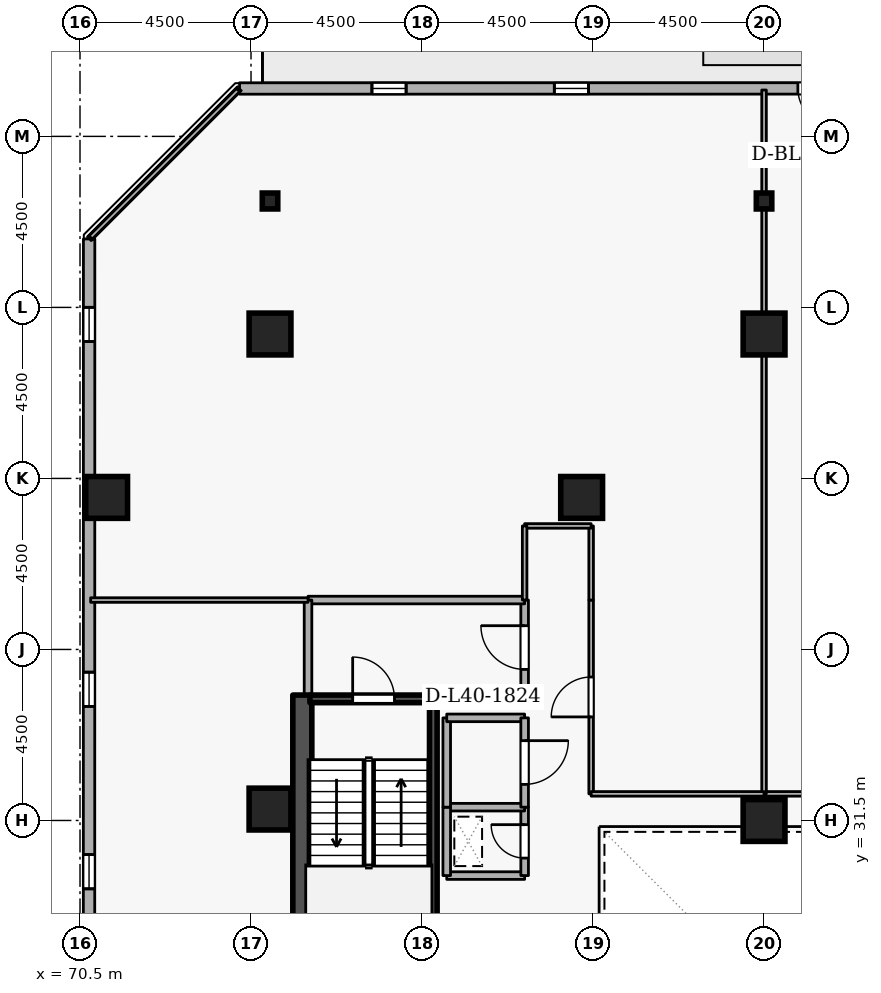
"""IFC4 building model, lengths in metres.
Left out: names, types, materials, properties, quantities, classifications, styles, units other than length and angle.
Written with IfcOpenShell. Run it as: python <this file> out.ifc"""

import sys

from ifc_helpers import new_model, si_unit, direction, frame, frame_2d, origin, origin_2d, place, context, subcontext, project, spatial, rectangle, i_section, extrude, element, fill, save


model = new_model("IFC4")
c1 = context("Model", 3, precision=1e-05, world=origin(), true_north=direction((0.0, 1.0)))
c2 = subcontext(c1, "Body", "Model", "MODEL_VIEW")
j1 = project(units=[si_unit("LENGTHUNIT", "METRE"), si_unit("PLANEANGLEUNIT", "RADIAN")], contexts=[c1])
p1 = place(None, origin())
s1 = spatial("IfcSite", under=j1, at=p1, CompositionType="ELEMENT")
p2 = place(p1, origin())
s2 = spatial("IfcBuilding", under=s1, at=p2, CompositionType="ELEMENT")
p3 = place(p2, frame((0.0, 0.0, 152.7)))
s3 = spatial("IfcBuildingStorey", under=s2, at=p3, CompositionType="ELEMENT", Elevation=152.7)
p4 = place(p3, frame((76.35, 19.2, 0.0), z_axis=(0.0, 0.0, 1.0), x_axis=(0.0, 1.0, 0.0)))
e1 = element("IfcWall", 1, at=p4, inside=s3, PredefinedType="SHEAR", context=c2, shape_type="SweptSolid", body=[
    extrude(rectangle(XDim=15.6, YDim=0.5, at=frame_2d((7.8, 0.0))), origin(), (0.0, 0.0, 1.0), 3.6),
])
for number, where, z_axis, x_axis in (
    (2, (88.5, 44.3, 0.0), (0.0, 0.0, 1.0), (1.0, 0.0, 0.0)),
    (3, (75.5, 44.3, 0.0), (0.0, 0.0, 1.0), (1.0, 0.0, 0.0)),
    (4, (71.2, 40.0, 0.0), (0.0, 0.0, 1.0), (1.0, 0.0, 0.0)),
    (5, (83.7, 40.0, 0.0), (0.0, 0.0, 1.0), (1.0, 0.0, 0.0)),
    (6, (75.5, 31.8, 0.0), (0.0, 0.0, 1.0), (1.0, 0.0, 0.0)),
    (7, (88.5, 31.5, 0.0), (0.0, 0.0, 1.0), (1.0, 0.0, 0.0)),
):
    element("IfcColumn", number, at=place(p3, frame(where, z_axis=z_axis, x_axis=x_axis)), inside=s3, PredefinedType="COLUMN", context=c2, shape_type="SweptSolid", body=[
        extrude(rectangle(XDim=1.1, YDim=1.1, at=origin_2d()), origin(), (0.0, 0.0, 1.0), 3.6),
    ])
for number, where, z_axis, x_axis in (
    (8, (88.5, 47.8, 0.0), (0.0, 0.0, 1.0), (1.0, 0.0, 0.0)),
    (9, (75.5, 47.8, 0.0), (0.0, 0.0, 1.0), (1.0, 0.0, 0.0)),
):
    element("IfcColumn", number, at=place(p3, frame(where, z_axis=z_axis, x_axis=x_axis)), inside=s3, PredefinedType="COLUMN", context=c2, shape_type="SweptSolid", body=[
        extrude(i_section(OverallWidth=0.407, OverallDepth=0.419, WebThickness=0.031, FlangeThickness=0.049, FilletRadius=0.015, at=origin_2d()), origin(), (0.0, 0.0, 1.0), 3.6),
    ])
p5 = place(p3, frame((109.681, 50.765, 0.0), z_axis=(0.0, 0.0, 1.0), x_axis=(-0.999999991209, -0.000132597301, 0.0)))
e10 = element("IfcWall", 10, at=p5, inside=s3, PredefinedType="STANDARD", context=c2, shape_type="SweptSolid", body=[
    extrude(rectangle(XDim=34.983, YDim=0.3, at=frame_2d((17.492, 0.0))), origin(), (0.0, 0.0, 1.0), 2.7),
])
p6 = place(p5, frame((19.292, 0.0, 0.0)))
e11 = element("IfcOpeningElement", 11, at=p6, cuts=e10, PredefinedType="OPENING", context=c2, shape_type="SweptSolid", body=[
    extrude(rectangle(XDim=1.0, YDim=2.08, at=frame_2d((0.5, 1.04))), frame((0.0, 0.16, 0.0), z_axis=(0.0, -1.0, 0.0), x_axis=(1.0, 0.0, 0.0)), (0.0, 0.0, 1.0), 0.32),
])
p7 = place(p5, frame((1.8, 0.0, 0.72)))
e12 = element("IfcOpeningElement", 12, at=p7, cuts=e10, PredefinedType="OPENING", context=c2, shape_type="SweptSolid", body=[
    extrude(rectangle(XDim=0.9, YDim=1.75, at=frame_2d((0.45, 0.875))), frame((0.0, 0.16, 0.0), z_axis=(0.0, -1.0, 0.0), x_axis=(1.0, 0.0, 0.0)), (0.0, 0.0, 1.0), 0.32),
])
p8 = place(p5, frame((6.6, 0.0, 0.72)))
e13 = element("IfcOpeningElement", 13, at=p8, cuts=e10, PredefinedType="OPENING", context=c2, shape_type="SweptSolid", body=[
    extrude(rectangle(XDim=0.9, YDim=1.75, at=frame_2d((0.45, 0.875))), frame((0.0, 0.16, 0.0), z_axis=(0.0, -1.0, 0.0), x_axis=(1.0, 0.0, 0.0)), (0.0, 0.0, 1.0), 0.32),
])
p9 = place(p5, frame((11.4, 0.0, 0.72)))
e14 = element("IfcOpeningElement", 14, at=p9, cuts=e10, PredefinedType="OPENING", context=c2, shape_type="SweptSolid", body=[
    extrude(rectangle(XDim=0.9, YDim=1.75, at=frame_2d((0.45, 0.875))), frame((0.0, 0.16, 0.0), z_axis=(0.0, -1.0, 0.0), x_axis=(1.0, 0.0, 0.0)), (0.0, 0.0, 1.0), 0.32),
])
p10 = place(p5, frame((16.2, 0.0, 0.72)))
e15 = element("IfcOpeningElement", 15, at=p10, cuts=e10, PredefinedType="OPENING", context=c2, shape_type="SweptSolid", body=[
    extrude(rectangle(XDim=0.9, YDim=1.75, at=frame_2d((0.45, 0.875))), frame((0.0, 0.16, 0.0), z_axis=(0.0, -1.0, 0.0), x_axis=(1.0, 0.0, 0.0)), (0.0, 0.0, 1.0), 0.32),
])
p11 = place(p5, frame((25.8, 0.0, 0.72)))
e16 = element("IfcOpeningElement", 16, at=p11, cuts=e10, PredefinedType="OPENING", context=c2, shape_type="SweptSolid", body=[
    extrude(rectangle(XDim=0.9, YDim=1.75, at=frame_2d((0.45, 0.875))), frame((0.0, 0.16, 0.0), z_axis=(0.0, -1.0, 0.0), x_axis=(1.0, 0.0, 0.0)), (0.0, 0.0, 1.0), 0.32),
])
p12 = place(p5, frame((30.6, 0.0, 0.72)))
e17 = element("IfcOpeningElement", 17, at=p12, cuts=e10, PredefinedType="OPENING", context=c2, shape_type="SweptSolid", body=[
    extrude(rectangle(XDim=0.9, YDim=1.75, at=frame_2d((0.45, 0.875))), frame((0.0, 0.16, 0.0), z_axis=(0.0, -1.0, 0.0), x_axis=(1.0, 0.0, 0.0)), (0.0, 0.0, 1.0), 0.32),
])
p13 = place(p3, frame((70.74, 46.802, 0.0), z_axis=(0.0, 0.0, 1.0), x_axis=(-0.000132597301, -0.999999991209, 0.0)))
e18 = element("IfcWall", 18, at=p13, inside=s3, PredefinedType="STANDARD", context=c2, shape_type="SweptSolid", body=[
    extrude(rectangle(XDim=34.983, YDim=0.3, at=frame_2d((17.492, 0.0))), origin(), (0.0, 0.0, 1.0), 2.7),
])
p14 = place(p13, frame((1.8, 0.0, 0.72)))
e19 = element("IfcOpeningElement", 19, at=p14, cuts=e18, PredefinedType="OPENING", context=c2, shape_type="SweptSolid", body=[
    extrude(rectangle(XDim=0.9, YDim=1.75, at=frame_2d((0.45, 0.875))), frame((0.0, 0.16, 0.0), z_axis=(0.0, -1.0, 0.0), x_axis=(1.0, 0.0, 0.0)), (0.0, 0.0, 1.0), 0.32),
])
p15 = place(p13, frame((11.4, 0.0, 0.72)))
e20 = element("IfcOpeningElement", 20, at=p15, cuts=e18, PredefinedType="OPENING", context=c2, shape_type="SweptSolid", body=[
    extrude(rectangle(XDim=0.9, YDim=1.75, at=frame_2d((0.45, 0.875))), frame((0.0, 0.16, 0.0), z_axis=(0.0, -1.0, 0.0), x_axis=(1.0, 0.0, 0.0)), (0.0, 0.0, 1.0), 0.32),
])
p16 = place(p13, frame((16.2, 0.0, 0.72)))
e21 = element("IfcOpeningElement", 21, at=p16, cuts=e18, PredefinedType="OPENING", context=c2, shape_type="SweptSolid", body=[
    extrude(rectangle(XDim=0.9, YDim=1.75, at=frame_2d((0.45, 0.875))), frame((0.0, 0.16, 0.0), z_axis=(0.0, -1.0, 0.0), x_axis=(1.0, 0.0, 0.0)), (0.0, 0.0, 1.0), 0.32),
])
p17 = place(p13, frame((21.0, 0.0, 0.72)))
e22 = element("IfcOpeningElement", 22, at=p17, cuts=e18, PredefinedType="OPENING", context=c2, shape_type="SweptSolid", body=[
    extrude(rectangle(XDim=0.9, YDim=1.75, at=frame_2d((0.45, 0.875))), frame((0.0, 0.16, 0.0), z_axis=(0.0, -1.0, 0.0), x_axis=(1.0, 0.0, 0.0)), (0.0, 0.0, 1.0), 0.32),
])
p18 = place(p13, frame((25.8, 0.0, 0.72)))
e23 = element("IfcOpeningElement", 23, at=p18, cuts=e18, PredefinedType="OPENING", context=c2, shape_type="SweptSolid", body=[
    extrude(rectangle(XDim=0.9, YDim=1.75, at=frame_2d((0.45, 0.875))), frame((0.0, 0.16, 0.0), z_axis=(0.0, -1.0, 0.0), x_axis=(1.0, 0.0, 0.0)), (0.0, 0.0, 1.0), 0.32),
])
p19 = place(p13, frame((30.6, 0.0, 0.72)))
e24 = element("IfcOpeningElement", 24, at=p19, cuts=e18, PredefinedType="OPENING", context=c2, shape_type="SweptSolid", body=[
    extrude(rectangle(XDim=0.9, YDim=1.75, at=frame_2d((0.45, 0.875))), frame((0.0, 0.16, 0.0), z_axis=(0.0, -1.0, 0.0), x_axis=(1.0, 0.0, 0.0)), (0.0, 0.0, 1.0), 0.32),
])
p20 = place(p3, frame((76.55, 34.7, 0.0), z_axis=(0.0, 0.0, 1.0), x_axis=(1.0, 0.0, 0.0)))
e25 = element("IfcWall", 25, at=p20, inside=s3, PredefinedType="SHEAR", context=c2, shape_type="SweptSolid", body=[
    extrude(rectangle(XDim=3.35, YDim=0.2, at=frame_2d((1.675, 0.0))), origin(), (0.0, 0.0, 1.0), 3.6),
])
p21 = place(p20, frame((1.125, 0.0, 0.0)))
e26 = element("IfcOpeningElement", 26, at=p21, cuts=e25, PredefinedType="OPENING", context=c2, shape_type="SweptSolid", body=[
    extrude(rectangle(XDim=1.1, YDim=2.1, at=frame_2d((0.55, 1.05))), frame((0.0, 0.11, 0.0), z_axis=(0.0, -1.0, 0.0), x_axis=(1.0, 0.0, 0.0)), (0.0, 0.0, 1.0), 0.22),
])
p22 = place(p3, frame((79.797, 27.45, 0.0), z_axis=(0.0, 0.0, 1.0), x_axis=(0.0, 1.0, 0.0)))
e27 = element("IfcWall", 27, at=p22, inside=s3, PredefinedType="SHEAR", context=c2, shape_type="SweptSolid", body=[
    extrude(rectangle(XDim=7.1, YDim=0.2, at=frame_2d((3.55, 0.0))), origin(), (0.0, 0.0, 1.0), 3.6),
])
p23 = place(p3, frame((79.9, 34.8, 0.0), z_axis=(0.0, 0.0, 1.0), x_axis=(1.0, 0.0, 0.0)))
e28 = element("IfcWall", 28, at=p23, inside=s3, PredefinedType="STANDARD", context=c2, shape_type="SweptSolid", body=[
    extrude(rectangle(XDim=2.3, YDim=0.2, at=frame_2d((1.15, 0.0))), origin(), (0.0, 0.0, 1.0), 2.545),
])
p24 = place(p3, frame((82.2, 34.8, 0.0), z_axis=(0.0, 0.0, 1.0), x_axis=(0.0, 1.0, 0.0)))
e29 = element("IfcWall", 29, at=p24, inside=s3, PredefinedType="STANDARD", context=c2, shape_type="SweptSolid", body=[
    extrude(rectangle(XDim=2.5, YDim=0.2, at=frame_2d((1.25, 0.0))), origin(), (0.0, 0.0, 1.0), 3.34),
])
p25 = place(p24, frame((0.675, 0.0, 0.0)))
e30 = element("IfcOpeningElement", 30, at=p25, cuts=e29, PredefinedType="OPENING", context=c2, shape_type="SweptSolid", body=[
    extrude(rectangle(XDim=1.15, YDim=2.1, at=frame_2d((0.575, 1.05))), frame((0.0, 0.11, 0.0), z_axis=(0.0, -1.0, 0.0), x_axis=(1.0, 0.0, 0.0)), (0.0, 0.0, 1.0), 0.22),
])
p26 = place(p3, frame((82.2, 37.3, 0.0), z_axis=(0.0, 0.0, 1.0), x_axis=(-1.0, 0.0, 0.0)))
e31 = element("IfcWall", 31, at=p26, inside=s3, PredefinedType="STANDARD", context=c2, shape_type="SweptSolid", body=[
    extrude(rectangle(XDim=5.7, YDim=0.2, at=frame_2d((2.85, 0.0))), origin(), (0.0, 0.0, 1.0), 3.34),
])
p27 = place(p3, frame((76.5, 37.3, 0.0), z_axis=(0.0, 0.0, 1.0), x_axis=(0.0, -1.0, 0.0)))
e32 = element("IfcWall", 32, at=p27, inside=s3, PredefinedType="STANDARD", context=c2, shape_type="SweptSolid", body=[
    extrude(rectangle(XDim=2.5, YDim=0.2, at=frame_2d((1.25, 0.0))), origin(), (0.0, 0.0, 1.0), 3.34),
])
p28 = place(p3, frame((80.15, 30.05, 0.0), z_axis=(0.0, 0.0, 1.0), x_axis=(1.0, 0.0, 0.0)))
e33 = element("IfcWall", 33, at=p28, inside=s3, PredefinedType="STANDARD", context=c2, shape_type="SweptSolid", body=[
    extrude(rectangle(XDim=2.05, YDim=0.2, at=frame_2d((1.025, 0.0))), origin(), (0.0, 0.0, 1.0), 3.34),
])
p29 = place(p3, frame((82.2, 30.05, 0.0), z_axis=(0.0, 0.0, 1.0), x_axis=(0.0, 1.0, 0.0)))
e34 = element("IfcWall", 34, at=p29, inside=s3, PredefinedType="STANDARD", context=c2, shape_type="SweptSolid", body=[
    extrude(rectangle(XDim=1.8, YDim=0.2, at=frame_2d((0.9, 0.0))), origin(), (0.0, 0.0, 1.0), 3.34),
])
p30 = place(p29, frame((0.46, 0.0, 0.0)))
e35 = element("IfcOpeningElement", 35, at=p30, cuts=e34, PredefinedType="OPENING", context=c2, shape_type="SweptSolid", body=[
    extrude(rectangle(XDim=0.88, YDim=2.04, at=frame_2d((0.44, 1.02))), frame((0.0, 0.11, 0.0), z_axis=(0.0, -1.0, 0.0), x_axis=(1.0, 0.0, 0.0)), (0.0, 0.0, 1.0), 0.22),
])
p31 = place(p3, frame((82.2, 31.85, 0.0), z_axis=(0.0, 0.0, 1.0), x_axis=(-1.0, 0.0, 0.0)))
e36 = element("IfcWall", 36, at=p31, inside=s3, PredefinedType="STANDARD", context=c2, shape_type="SweptSolid", body=[
    extrude(rectangle(XDim=2.05, YDim=0.2, at=frame_2d((1.025, 0.0))), origin(), (0.0, 0.0, 1.0), 3.34),
])
p32 = place(p3, frame((80.15, 31.85, 0.0), z_axis=(0.0, 0.0, 1.0), x_axis=(0.0, -1.0, 0.0)))
e37 = element("IfcWall", 37, at=p32, inside=s3, PredefinedType="STANDARD", context=c2, shape_type="SweptSolid", body=[
    extrude(rectangle(XDim=1.8, YDim=0.2, at=frame_2d((0.9, 0.0))), origin(), (0.0, 0.0, 1.0), 3.34),
])
p33 = place(p3, frame((80.15, 31.85, 0.0), z_axis=(0.0, 0.0, 1.0), x_axis=(0.0, 1.0, 0.0)))
e38 = element("IfcWall", 38, at=p33, inside=s3, PredefinedType="STANDARD", context=c2, shape_type="SweptSolid", body=[
    extrude(rectangle(XDim=2.35, YDim=0.2, at=frame_2d((1.175, 0.0))), origin(), (0.0, 0.0, 1.0), 3.34),
])
p34 = place(p3, frame((80.15, 34.2, 0.0), z_axis=(0.0, 0.0, 1.0), x_axis=(1.0, 0.0, 0.0)))
e39 = element("IfcWall", 39, at=p34, inside=s3, PredefinedType="STANDARD", context=c2, shape_type="SweptSolid", body=[
    extrude(rectangle(XDim=2.05, YDim=0.2, at=frame_2d((1.025, 0.0))), origin(), (0.0, 0.0, 1.0), 2.545),
])
p35 = place(p3, frame((82.2, 34.2, 0.0), z_axis=(0.0, 0.0, 1.0), x_axis=(0.0, -1.0, 0.0)))
e40 = element("IfcWall", 40, at=p35, inside=s3, PredefinedType="STANDARD", context=c2, shape_type="SweptSolid", body=[
    extrude(rectangle(XDim=2.35, YDim=0.2, at=frame_2d((1.175, 0.0))), origin(), (0.0, 0.0, 1.0), 3.34),
])
p36 = place(p35, frame((0.6, 0.0, 0.0)))
e41 = element("IfcOpeningElement", 41, at=p36, cuts=e40, PredefinedType="OPENING", context=c2, shape_type="SweptSolid", body=[
    extrude(rectangle(XDim=1.15, YDim=2.1, at=frame_2d((0.575, 1.05))), frame((0.0, 0.11, 0.0), z_axis=(0.0, -1.0, 0.0), x_axis=(1.0, 0.0, 0.0)), (0.0, 0.0, 1.0), 0.22),
])
p37 = place(p3, frame((93.05, 32.2, 0.0), z_axis=(0.0, 0.0, 1.0), x_axis=(-1.0, 0.0, 0.0)))
e42 = element("IfcWall", 42, at=p37, inside=s3, PredefinedType="PARTITIONING", context=c2, shape_type="SweptSolid", body=[
    extrude(rectangle(XDim=4.55, YDim=0.12, at=frame_2d((2.275, 0.0))), origin(), (0.0, 0.0, 1.0), 3.34),
])
p38 = place(p3, frame((88.5, 32.2, 0.0), z_axis=(0.0, 0.0, 1.0), x_axis=(0.0, 1.0, 0.0)))
e43 = element("IfcWall", 43, at=p38, inside=s3, PredefinedType="PARTITIONING", context=c2, shape_type="SweptSolid", body=[
    extrude(rectangle(XDim=18.52, YDim=0.12, at=frame_2d((9.26, 0.0))), origin(), (0.0, 0.0, 1.0), 2.932),
])
p39 = place(p3, frame((83.95, 32.2, 0.0), z_axis=(0.0, 0.0, 1.0), x_axis=(0.0, 1.0, 0.0)))
e44 = element("IfcWall", 44, at=p39, inside=s3, PredefinedType="PARTITIONING", context=c2, shape_type="SweptSolid", body=[
    extrude(rectangle(XDim=5.1, YDim=0.12, at=frame_2d((2.55, 0.0))), origin(), (0.0, 0.0, 1.0), 3.34),
])
p40 = place(p39, frame((2.025, 0.0, 0.0)))
e45 = element("IfcOpeningElement", 45, at=p40, cuts=e44, PredefinedType="OPENING", context=c2, shape_type="SweptSolid", body=[
    extrude(rectangle(XDim=1.05, YDim=2.1, at=frame_2d((0.525, 1.05))), frame((0.0, 0.07, 0.0), z_axis=(0.0, -1.0, 0.0), x_axis=(1.0, 0.0, 0.0)), (0.0, 0.0, 1.0), 0.14),
])
p41 = place(p3, frame((83.95, 37.3, 0.0), z_axis=(0.0, 0.0, 1.0), x_axis=(0.0, 1.0, 0.0)))
e46 = element("IfcWall", 46, at=p41, inside=s3, PredefinedType="PARTITIONING", context=c2, shape_type="SweptSolid", body=[
    extrude(rectangle(XDim=1.95, YDim=0.12, at=frame_2d((0.975, 0.0))), origin(), (0.0, 0.0, 1.0), 3.34),
])
p42 = place(p3, frame((83.95, 39.25, 0.0), z_axis=(0.0, 0.0, 1.0), x_axis=(-1.0, 0.0, 0.0)))
e47 = element("IfcWall", 47, at=p42, inside=s3, PredefinedType="PARTITIONING", context=c2, shape_type="SweptSolid", body=[
    extrude(rectangle(XDim=1.75, YDim=0.12, at=frame_2d((0.875, 0.0))), origin(), (0.0, 0.0, 1.0), 3.34),
])
p43 = place(p3, frame((82.2, 39.25, 0.0), z_axis=(0.0, 0.0, 1.0), x_axis=(0.0, -1.0, 0.0)))
e48 = element("IfcWall", 48, at=p43, inside=s3, PredefinedType="PARTITIONING", context=c2, shape_type="SweptSolid", body=[
    extrude(rectangle(XDim=1.95, YDim=0.12, at=frame_2d((0.975, 0.0))), origin(), (0.0, 0.0, 1.0), 3.34),
])
p44 = place(p3, frame((76.5, 37.3, 0.0), z_axis=(0.0, 0.0, 1.0), x_axis=(-1.0, 0.0, 0.0)))
e49 = element("IfcWall", 49, at=p44, inside=s3, PredefinedType="PARTITIONING", context=c2, shape_type="SweptSolid", body=[
    extrude(rectangle(XDim=5.72, YDim=0.12, at=frame_2d((2.86, 0.0))), origin(), (0.0, 0.0, 1.0), 3.34),
])
p45 = place(p3, frame((70.78, 46.84, 0.0), z_axis=(0.0, 0.0, 1.0), x_axis=(0.707106781187, 0.707106781187, 0.0)))
e50 = element("IfcWall", 50, at=p45, inside=s3, PredefinedType="PARTITIONING", context=c2, shape_type="SweptSolid", body=[
    extrude(rectangle(XDim=5.487, YDim=0.12, at=frame_2d((2.743, 0.0))), origin(), (0.0, 0.0, 1.0), 3.34),
])
p46 = place(p3, frame((88.5, 32.2, 0.0), z_axis=(0.0, 0.0, 1.0), x_axis=(-1.0, 0.0, 0.0)))
e51 = element("IfcWall", 51, at=p46, inside=s3, PredefinedType="PARTITIONING", context=c2, shape_type="SweptSolid", body=[
    extrude(rectangle(XDim=4.55, YDim=0.12, at=frame_2d((2.275, 0.0))), origin(), (0.0, 0.0, 1.0), 3.34),
])
p47 = place(p6, origin())
e52 = element("IfcDoor", 52, at=p47, inside=s3, OperationType="SINGLE_SWING_LEFT", PredefinedType="DOOR", context=c2, shape_type="SweptSolid", body=[
    extrude(rectangle(XDim=1.0, YDim=2.08, at=frame_2d((0.5, 1.04))), frame((0.0, 0.025, 0.0), z_axis=(0.0, -1.0, 0.0), x_axis=(1.0, 0.0, 0.0)), (0.0, 0.0, 1.0), 0.05),
])
fill(e11, e52)
p48 = place(p11, origin())
e53 = element("IfcWindow", 53, at=p48, inside=s3, PartitioningType="SINGLE_PANEL", PredefinedType="WINDOW", context=c2, shape_type="SweptSolid", body=[
    extrude(rectangle(XDim=0.9, YDim=1.75, at=frame_2d((0.45, 0.875))), frame((0.0, 0.03, 0.0), z_axis=(0.0, -1.0, 0.0), x_axis=(1.0, 0.0, 0.0)), (0.0, 0.0, 1.0), 0.06),
])
fill(e16, e53)
p49 = place(p12, origin())
e54 = element("IfcWindow", 54, at=p49, inside=s3, PartitioningType="SINGLE_PANEL", PredefinedType="WINDOW", context=c2, shape_type="SweptSolid", body=[
    extrude(rectangle(XDim=0.9, YDim=1.75, at=frame_2d((0.45, 0.875))), frame((0.0, 0.03, 0.0), z_axis=(0.0, -1.0, 0.0), x_axis=(1.0, 0.0, 0.0)), (0.0, 0.0, 1.0), 0.06),
])
fill(e17, e54)
p50 = place(p14, origin())
e55 = element("IfcWindow", 55, at=p50, inside=s3, PartitioningType="SINGLE_PANEL", PredefinedType="WINDOW", context=c2, shape_type="SweptSolid", body=[
    extrude(rectangle(XDim=0.9, YDim=1.75, at=frame_2d((0.45, 0.875))), frame((0.0, 0.03, 0.0), z_axis=(0.0, -1.0, 0.0), x_axis=(1.0, 0.0, 0.0)), (0.0, 0.0, 1.0), 0.06),
])
fill(e19, e55)
p51 = place(p15, origin())
e56 = element("IfcWindow", 56, at=p51, inside=s3, PartitioningType="SINGLE_PANEL", PredefinedType="WINDOW", context=c2, shape_type="SweptSolid", body=[
    extrude(rectangle(XDim=0.9, YDim=1.75, at=frame_2d((0.45, 0.875))), frame((0.0, 0.03, 0.0), z_axis=(0.0, -1.0, 0.0), x_axis=(1.0, 0.0, 0.0)), (0.0, 0.0, 1.0), 0.06),
])
fill(e20, e56)
p52 = place(p16, origin())
e57 = element("IfcWindow", 57, at=p52, inside=s3, PartitioningType="SINGLE_PANEL", PredefinedType="WINDOW", context=c2, shape_type="SweptSolid", body=[
    extrude(rectangle(XDim=0.9, YDim=1.75, at=frame_2d((0.45, 0.875))), frame((0.0, 0.03, 0.0), z_axis=(0.0, -1.0, 0.0), x_axis=(1.0, 0.0, 0.0)), (0.0, 0.0, 1.0), 0.06),
])
fill(e21, e57)
p53 = place(p21, origin())
e58 = element("IfcDoor", 58, at=p53, inside=s3, OperationType="SINGLE_SWING_LEFT", PredefinedType="DOOR", context=c2, shape_type="SweptSolid", body=[
    extrude(rectangle(XDim=1.1, YDim=2.1, at=frame_2d((0.55, 1.05))), frame((0.0, 0.025, 0.0), z_axis=(0.0, -1.0, 0.0), x_axis=(1.0, 0.0, 0.0)), (0.0, 0.0, 1.0), 0.05),
])
fill(e26, e58)
p54 = place(p25, origin())
e59 = element("IfcDoor", 59, at=p54, inside=s3, OperationType="SINGLE_SWING_RIGHT", PredefinedType="DOOR", context=c2, shape_type="SweptSolid", body=[
    extrude(rectangle(XDim=1.15, YDim=2.1, at=frame_2d((0.575, 1.05))), frame((0.0, 0.025, 0.0), z_axis=(0.0, -1.0, 0.0), x_axis=(1.0, 0.0, 0.0)), (0.0, 0.0, 1.0), 0.05),
])
fill(e30, e59)
p55 = place(p30, origin())
e60 = element("IfcDoor", 60, at=p55, inside=s3, OperationType="SINGLE_SWING_RIGHT", PredefinedType="DOOR", context=c2, shape_type="SweptSolid", body=[
    extrude(rectangle(XDim=0.88, YDim=2.04, at=frame_2d((0.44, 1.02))), frame((0.0, 0.025, 0.0), z_axis=(0.0, -1.0, 0.0), x_axis=(1.0, 0.0, 0.0)), (0.0, 0.0, 1.0), 0.05),
])
fill(e35, e60)
p56 = place(p36, origin())
e61 = element("IfcDoor", 61, at=p56, inside=s3, OperationType="SINGLE_SWING_LEFT", PredefinedType="DOOR", context=c2, shape_type="SweptSolid", body=[
    extrude(rectangle(XDim=1.15, YDim=2.1, at=frame_2d((0.575, 1.05))), frame((0.0, 0.025, 0.0), z_axis=(0.0, -1.0, 0.0), x_axis=(1.0, 0.0, 0.0)), (0.0, 0.0, 1.0), 0.05),
])
fill(e41, e61)
p57 = place(p40, origin())
e62 = element("IfcDoor", 62, at=p57, inside=s3, OperationType="SINGLE_SWING_LEFT", PredefinedType="DOOR", context=c2, shape_type="SweptSolid", body=[
    extrude(rectangle(XDim=1.05, YDim=2.1, at=frame_2d((0.525, 1.05))), frame((0.0, 0.025, 0.0), z_axis=(0.0, -1.0, 0.0), x_axis=(1.0, 0.0, 0.0)), (0.0, 0.0, 1.0), 0.05),
])
fill(e45, e62)
save(model, sys.argv[1])
